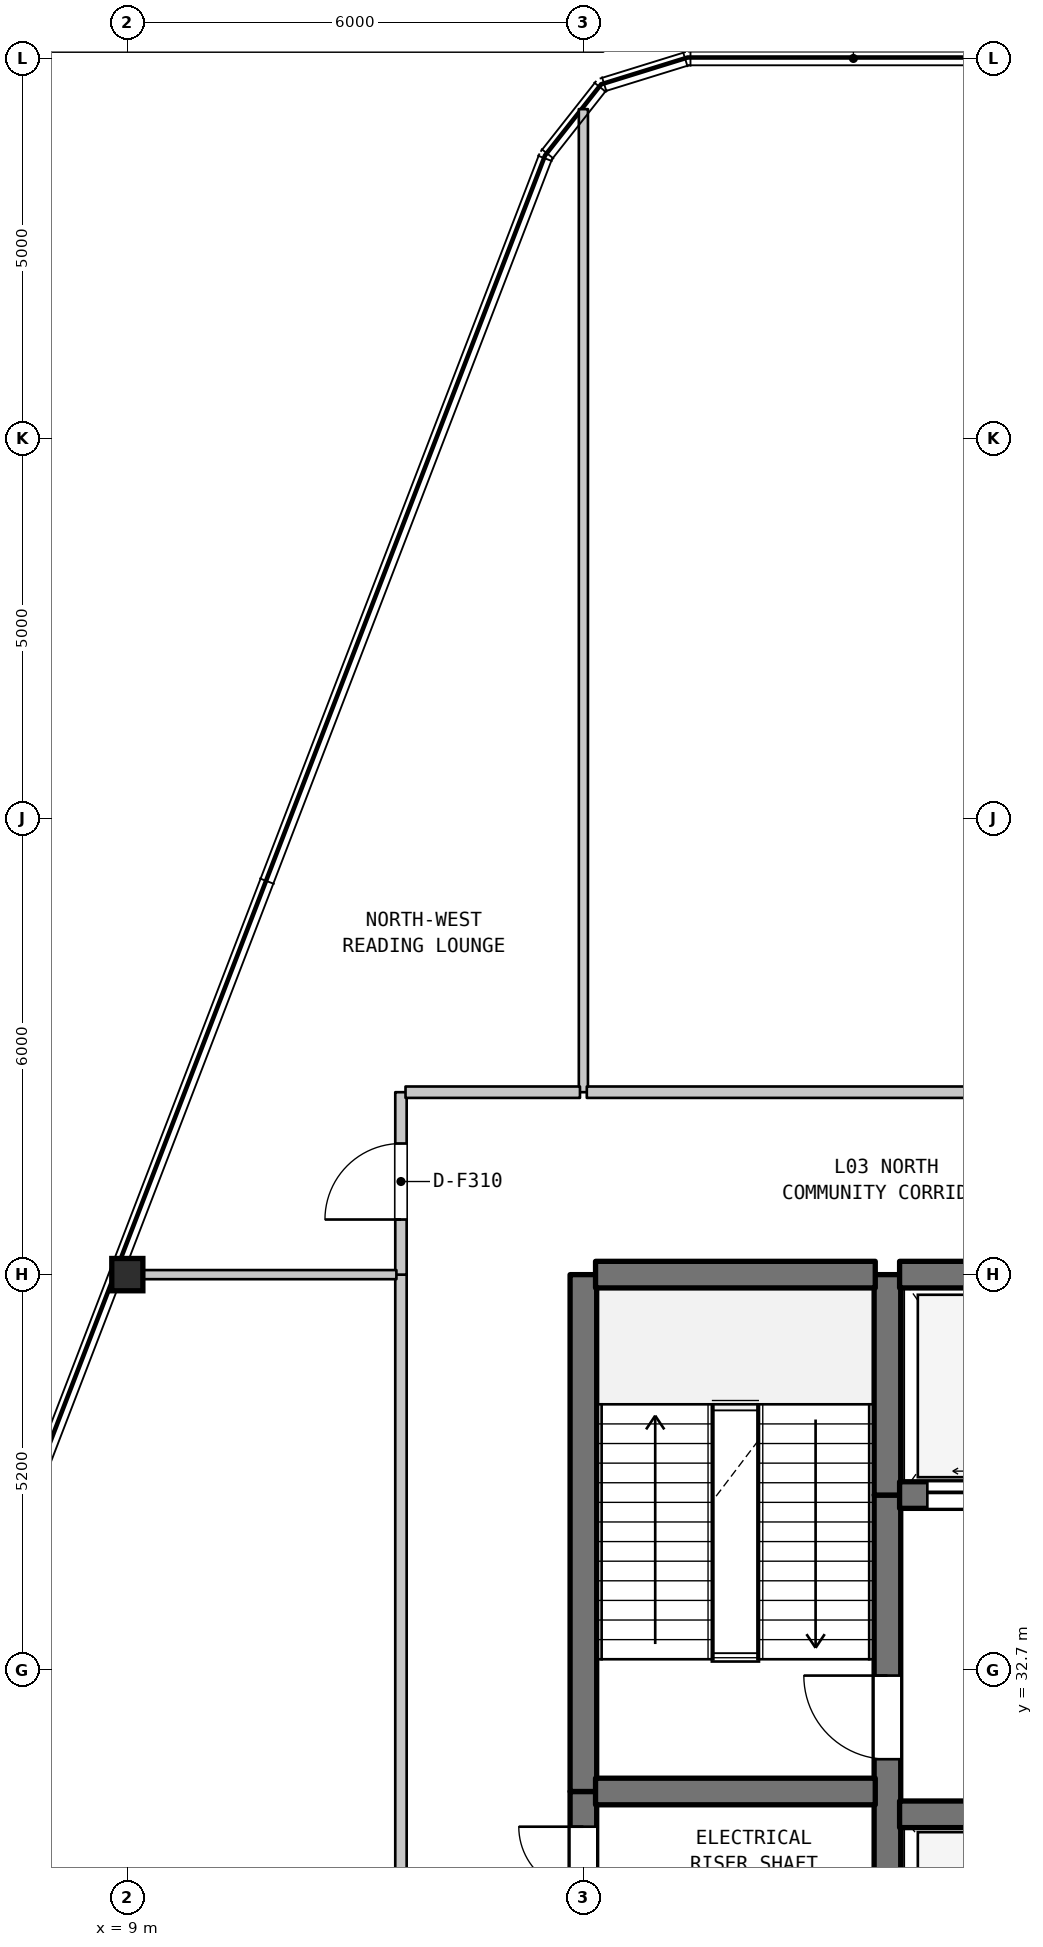
"""IFC4 building model, lengths in metres.
Left out: names, types, materials, properties, quantities, classifications, styles, units other than length and angle.
Written with IfcOpenShell. Run it as: python <this file> out.ifc"""

import sys

from ifc_helpers import new_model, si_unit, direction, frame, frame_2d, origin, origin_2d, place, context, subcontext, project, spatial, rectangle, i_section, extrude, element, fill, save


model = new_model("IFC4")
c1 = context("Model", 3, precision=1e-05, world=origin(), true_north=direction((0.0, 1.0)))
c2 = subcontext(c1, "Body", "Model", "MODEL_VIEW")
j1 = project(units=[si_unit("LENGTHUNIT", "METRE"), si_unit("PLANEANGLEUNIT", "RADIAN")], contexts=[c1])
p1 = place(None, origin())
s1 = spatial("IfcSite", under=j1, at=p1, CompositionType="ELEMENT")
p2 = place(p1, origin())
s2 = spatial("IfcBuilding", under=s1, at=p2, CompositionType="ELEMENT")
p3 = place(p2, frame((0.0, 0.0, 19.0)))
s3 = spatial("IfcBuildingStorey", under=s2, at=p3, CompositionType="ELEMENT", Elevation=19.0)
p4 = place(p3, frame((9.0, 37.9, 0.0), z_axis=(0.0, 0.0, 1.0), x_axis=(1.0, 0.0, 0.0)))
e1 = element("IfcColumn", 1, at=p4, inside=s3, PredefinedType="COLUMN", context=c2, shape_type="SweptSolid", body=[
    extrude(i_section(OverallWidth=0.409, OverallDepth=0.425, WebThickness=0.032, FlangeThickness=0.052, FilletRadius=0.015, at=origin_2d()), origin(), (0.0, 0.0, 1.0), 5.0),
])
p5 = place(p3, frame((12.6, 17.9, 0.0), z_axis=(0.0, 0.0, 1.0), x_axis=(0.0, 1.0, 0.0)))
e2 = element("IfcWall", 2, at=p5, inside=s3, PredefinedType="STANDARD", context=c2, shape_type="SweptSolid", body=[
    extrude(rectangle(XDim=20.0, YDim=0.15, at=frame_2d((10.0, 0.0))), origin(), (0.0, 0.0, 1.0), 4.685),
])
p6 = place(p5, frame((8.93, 0.0, 0.0)))
e3 = element("IfcOpeningElement", 3, at=p6, cuts=e2, PredefinedType="OPENING", context=c2, shape_type="SweptSolid", body=[
    extrude(rectangle(XDim=1.2, YDim=2.2, at=frame_2d((0.6, 1.1))), frame((0.0, 0.085, 0.0), z_axis=(0.0, -1.0, 0.0), x_axis=(1.0, 0.0, 0.0)), (0.0, 0.0, 1.0), 0.17),
])
p7 = place(p3, frame((12.6, 37.9, 0.0), z_axis=(0.0, 0.0, 1.0), x_axis=(0.0, 1.0, 0.0)))
e4 = element("IfcWall", 4, at=p7, inside=s3, PredefinedType="STANDARD", context=c2, shape_type="SweptSolid", body=[
    extrude(rectangle(XDim=2.4, YDim=0.15, at=frame_2d((1.2, 0.0))), origin(), (0.0, 0.0, 1.0), 4.685),
])
p8 = place(p7, frame((0.725, 0.0, 0.0)))
e5 = element("IfcOpeningElement", 5, at=p8, cuts=e4, PredefinedType="OPENING", context=c2, shape_type="SweptSolid", body=[
    extrude(rectangle(XDim=1.0, YDim=2.15, at=frame_2d((0.5, 1.075))), frame((0.0, 0.085, 0.0), z_axis=(0.0, -1.0, 0.0), x_axis=(1.0, 0.0, 0.0)), (0.0, 0.0, 1.0), 0.17),
])
p9 = place(p3, frame((15.0, 29.5, 0.0), z_axis=(0.0, 0.0, 1.0), x_axis=(0.0, 1.0, 0.0)))
e6 = element("IfcWall", 6, at=p9, inside=s3, PredefinedType="SHEAR", context=c2, shape_type="SweptSolid", body=[
    extrude(rectangle(XDim=1.6, YDim=0.35, at=frame_2d((0.8, 0.0))), origin(), (0.0, 0.0, 1.0), 4.685),
])
p10 = place(p9, frame((0.287, 0.0, 0.0)))
e7 = element("IfcOpeningElement", 7, at=p10, cuts=e6, PredefinedType="OPENING", context=c2, shape_type="SweptSolid", body=[
    extrude(rectangle(XDim=0.85, YDim=2.1, at=frame_2d((0.425, 1.05))), frame((0.0, 0.185, 0.0), z_axis=(0.0, -1.0, 0.0), x_axis=(1.0, 0.0, 0.0)), (0.0, 0.0, 1.0), 0.37),
])
p11 = place(p3, frame((15.0, 31.1, 0.0), z_axis=(0.0, 0.0, 1.0), x_axis=(0.0, 1.0, 0.0)))
e8 = element("IfcWall", 8, at=p11, inside=s3, PredefinedType="SHEAR", context=c2, shape_type="SweptSolid", body=[
    extrude(rectangle(XDim=6.8, YDim=0.35, at=frame_2d((3.4, 0.0))), origin(), (0.0, 0.0, 1.0), 4.685),
])
p12 = place(p3, frame((15.0, 40.3, 0.0), z_axis=(0.0, 0.0, 1.0), x_axis=(0.0, 1.0, 0.0)))
e9 = element("IfcWall", 9, at=p12, inside=s3, PredefinedType="PARTITIONING", context=c2, shape_type="SweptSolid", body=[
    extrude(rectangle(XDim=12.933, YDim=0.12, at=frame_2d((6.466, 0.0))), origin(), (0.0, 0.0, 1.0), 4.685),
])
p13 = place(p3, frame((19.0, 29.5, 0.0), z_axis=(0.0, 0.0, 1.0), x_axis=(0.0, 1.0, 0.0)))
e10 = element("IfcWall", 10, at=p13, inside=s3, PredefinedType="SHEAR", context=c2, shape_type="SweptSolid", body=[
    extrude(rectangle(XDim=5.5, YDim=0.35, at=frame_2d((2.75, 0.0))), origin(), (0.0, 0.0, 1.0), 4.685),
])
p14 = place(p13, frame((2.025, 0.0, 0.0)))
e11 = element("IfcOpeningElement", 11, at=p14, cuts=e10, PredefinedType="OPENING", context=c2, shape_type="SweptSolid", body=[
    extrude(rectangle(XDim=1.1, YDim=2.15, at=frame_2d((0.55, 1.075))), frame((0.0, 0.185, 0.0), z_axis=(0.0, -1.0, 0.0), x_axis=(1.0, 0.0, 0.0)), (0.0, 0.0, 1.0), 0.37),
])
p15 = place(p3, frame((19.0, 35.0, 0.0), z_axis=(0.0, 0.0, 1.0), x_axis=(0.0, 1.0, 0.0)))
e12 = element("IfcWall", 12, at=p15, inside=s3, PredefinedType="SHEAR", context=c2, shape_type="SweptSolid", body=[
    extrude(rectangle(XDim=2.9, YDim=0.35, at=frame_2d((1.45, 0.0))), origin(), (0.0, 0.0, 1.0), 4.685),
])
p16 = place(p3, frame((19.16, 30.8, 0.0), z_axis=(0.0, 0.0, 1.0), x_axis=(1.0, 0.0, 0.0)))
e13 = element("IfcWall", 13, at=p16, inside=s3, PredefinedType="SHEAR", context=c2, shape_type="SweptSolid", body=[
    extrude(rectangle(XDim=4.48, YDim=0.35, at=frame_2d((2.24, 0.0))), origin(), (0.0, 0.0, 1.0), 4.685),
])
p17 = place(p3, frame((15.16, 31.1, 0.0), z_axis=(0.0, 0.0, 1.0), x_axis=(1.0, 0.0, 0.0)))
e14 = element("IfcWall", 14, at=p17, inside=s3, PredefinedType="SHEAR", context=c2, shape_type="SweptSolid", body=[
    extrude(rectangle(XDim=3.68, YDim=0.35, at=frame_2d((1.84, 0.0))), origin(), (0.0, 0.0, 1.0), 4.685),
])
p18 = place(p3, frame((19.16, 35.0, 0.0), z_axis=(0.0, 0.0, 1.0), x_axis=(1.0, 0.0, 0.0)))
e15 = element("IfcWall", 15, at=p18, inside=s3, PredefinedType="SHEAR", context=c2, shape_type="SweptSolid", body=[
    extrude(rectangle(XDim=11.48, YDim=0.35, at=frame_2d((5.74, 0.0))), origin(), (0.0, 0.0, 1.0), 4.685),
])
p19 = place(p18, frame((0.365, 0.0, 0.0)))
e16 = element("IfcOpeningElement", 16, at=p19, cuts=e15, PredefinedType="OPENING", context=c2, shape_type="SweptSolid", body=[
    extrude(rectangle(XDim=1.35, YDim=2.2, at=frame_2d((0.675, 1.1))), frame((0.0, 0.185, 0.0), z_axis=(0.0, -1.0, 0.0), x_axis=(1.0, 0.0, 0.0)), (0.0, 0.0, 1.0), 0.37),
])
p20 = place(p18, frame((2.765, 0.0, 0.0)))
e17 = element("IfcOpeningElement", 17, at=p20, cuts=e15, PredefinedType="OPENING", context=c2, shape_type="SweptSolid", body=[
    extrude(rectangle(XDim=1.35, YDim=2.2, at=frame_2d((0.675, 1.1))), frame((0.0, 0.185, 0.0), z_axis=(0.0, -1.0, 0.0), x_axis=(1.0, 0.0, 0.0)), (0.0, 0.0, 1.0), 0.37),
])
p21 = place(p18, frame((4.915, 0.0, 0.0)))
e18 = element("IfcOpeningElement", 18, at=p21, cuts=e15, PredefinedType="OPENING", context=c2, shape_type="SweptSolid", body=[
    extrude(rectangle(XDim=1.2, YDim=2.2, at=frame_2d((0.6, 1.1))), frame((0.0, 0.185, 0.0), z_axis=(0.0, -1.0, 0.0), x_axis=(1.0, 0.0, 0.0)), (0.0, 0.0, 1.0), 0.37),
])
p22 = place(p18, frame((6.665, 0.0, 0.0)))
e19 = element("IfcOpeningElement", 19, at=p22, cuts=e15, PredefinedType="OPENING", context=c2, shape_type="SweptSolid", body=[
    extrude(rectangle(XDim=1.2, YDim=2.2, at=frame_2d((0.6, 1.1))), frame((0.0, 0.185, 0.0), z_axis=(0.0, -1.0, 0.0), x_axis=(1.0, 0.0, 0.0)), (0.0, 0.0, 1.0), 0.37),
])
p23 = place(p18, frame((8.415, 0.0, 0.0)))
e20 = element("IfcOpeningElement", 20, at=p23, cuts=e15, PredefinedType="OPENING", context=c2, shape_type="SweptSolid", body=[
    extrude(rectangle(XDim=1.2, YDim=2.2, at=frame_2d((0.6, 1.1))), frame((0.0, 0.185, 0.0), z_axis=(0.0, -1.0, 0.0), x_axis=(1.0, 0.0, 0.0)), (0.0, 0.0, 1.0), 0.37),
])
p24 = place(p18, frame((10.16, 0.0, 0.0)))
e21 = element("IfcOpeningElement", 21, at=p24, cuts=e15, PredefinedType="OPENING", context=c2, shape_type="SweptSolid", body=[
    extrude(rectangle(XDim=1.2, YDim=2.2, at=frame_2d((0.6, 1.1))), frame((0.0, 0.185, 0.0), z_axis=(0.0, -1.0, 0.0), x_axis=(1.0, 0.0, 0.0)), (0.0, 0.0, 1.0), 0.37),
])
p25 = place(p3, frame((8.856, 37.9, 0.0), z_axis=(0.0, 0.0, 1.0), x_axis=(1.0, 0.0, 0.0)))
e22 = element("IfcWall", 22, at=p25, inside=s3, PredefinedType="PARTITIONING", context=c2, shape_type="SweptSolid", body=[
    extrude(rectangle(XDim=3.684, YDim=0.12, at=frame_2d((1.842, 0.0))), origin(), (0.0, 0.0, 1.0), 4.185),
])
p26 = place(p3, frame((15.16, 37.9, 0.0), z_axis=(0.0, 0.0, 1.0), x_axis=(1.0, 0.0, 0.0)))
e23 = element("IfcWall", 23, at=p26, inside=s3, PredefinedType="SHEAR", context=c2, shape_type="SweptSolid", body=[
    extrude(rectangle(XDim=3.68, YDim=0.35, at=frame_2d((1.84, 0.0))), origin(), (0.0, 0.0, 1.0), 4.685),
])
p27 = place(p3, frame((19.16, 37.9, 0.0), z_axis=(0.0, 0.0, 1.0), x_axis=(1.0, 0.0, 0.0)))
e24 = element("IfcWall", 24, at=p27, inside=s3, PredefinedType="SHEAR", context=c2, shape_type="SweptSolid", body=[
    extrude(rectangle(XDim=11.48, YDim=0.35, at=frame_2d((5.74, 0.0))), origin(), (0.0, 0.0, 1.0), 4.685),
])
p28 = place(p3, frame((12.66, 40.3, 0.0), z_axis=(0.0, 0.0, 1.0), x_axis=(1.0, 0.0, 0.0)))
e25 = element("IfcWall", 25, at=p28, inside=s3, PredefinedType="STANDARD", context=c2, shape_type="SweptSolid", body=[
    extrude(rectangle(XDim=2.295, YDim=0.15, at=frame_2d((1.147, 0.0))), origin(), (0.0, 0.0, 1.0), 4.685),
])
p29 = place(p3, frame((15.045, 40.3, 0.0), z_axis=(0.0, 0.0, 1.0), x_axis=(1.0, 0.0, 0.0)))
e26 = element("IfcWall", 26, at=p29, inside=s3, PredefinedType="STANDARD", context=c2, shape_type="SweptSolid", body=[
    extrude(rectangle(XDim=17.895, YDim=0.15, at=frame_2d((8.948, 0.0))), origin(), (0.0, 0.0, 1.0), 4.685),
])
p30 = place(p29, frame((8.955, 0.0, 0.0)))
e27 = element("IfcOpeningElement", 27, at=p30, cuts=e26, PredefinedType="OPENING", context=c2, shape_type="SweptSolid", body=[
    extrude(rectangle(XDim=1.0, YDim=2.15, at=frame_2d((0.5, 1.075))), frame((0.0, 0.085, 0.0), z_axis=(0.0, -1.0, 0.0), x_axis=(1.0, 0.0, 0.0)), (0.0, 0.0, 1.0), 0.17),
])
p31 = place(p8, origin())
e28 = element("IfcDoor", 28, at=p31, inside=s3, OperationType="SINGLE_SWING_LEFT", PredefinedType="DOOR", context=c2, shape_type="SweptSolid", body=[
    extrude(rectangle(XDim=1.0, YDim=2.15, at=frame_2d((0.5, 1.075))), frame((0.0, 0.025, 0.0), z_axis=(0.0, -1.0, 0.0), x_axis=(1.0, 0.0, 0.0)), (0.0, 0.0, 1.0), 0.05),
])
fill(e5, e28)
p32 = place(p10, origin())
e29 = element("IfcDoor", 29, at=p32, inside=s3, OperationType="SINGLE_SWING_RIGHT", PredefinedType="DOOR", context=c2, shape_type="SweptSolid", body=[
    extrude(rectangle(XDim=0.85, YDim=2.1, at=frame_2d((0.425, 1.05))), frame((0.0, 0.025, 0.0), z_axis=(0.0, -1.0, 0.0), x_axis=(1.0, 0.0, 0.0)), (0.0, 0.0, 1.0), 0.05),
])
fill(e7, e29)
p33 = place(p14, origin())
e30 = element("IfcDoor", 30, at=p33, inside=s3, OperationType="SINGLE_SWING_RIGHT", PredefinedType="DOOR", context=c2, shape_type="SweptSolid", body=[
    extrude(rectangle(XDim=1.1, YDim=2.15, at=frame_2d((0.55, 1.075))), frame((0.0, 0.025, 0.0), z_axis=(0.0, -1.0, 0.0), x_axis=(1.0, 0.0, 0.0)), (0.0, 0.0, 1.0), 0.05),
])
fill(e11, e30)
p34 = place(p19, origin())
e31 = element("IfcDoor", 31, at=p34, inside=s3, OperationType="DOUBLE_DOOR_SLIDING", PredefinedType="DOOR", context=c2, shape_type="SweptSolid", body=[
    extrude(rectangle(XDim=1.35, YDim=2.2, at=frame_2d((0.675, 1.1))), frame((0.0, 0.025, 0.0), z_axis=(0.0, -1.0, 0.0), x_axis=(1.0, 0.0, 0.0)), (0.0, 0.0, 1.0), 0.05),
])
fill(e16, e31)
save(model, sys.argv[1])
